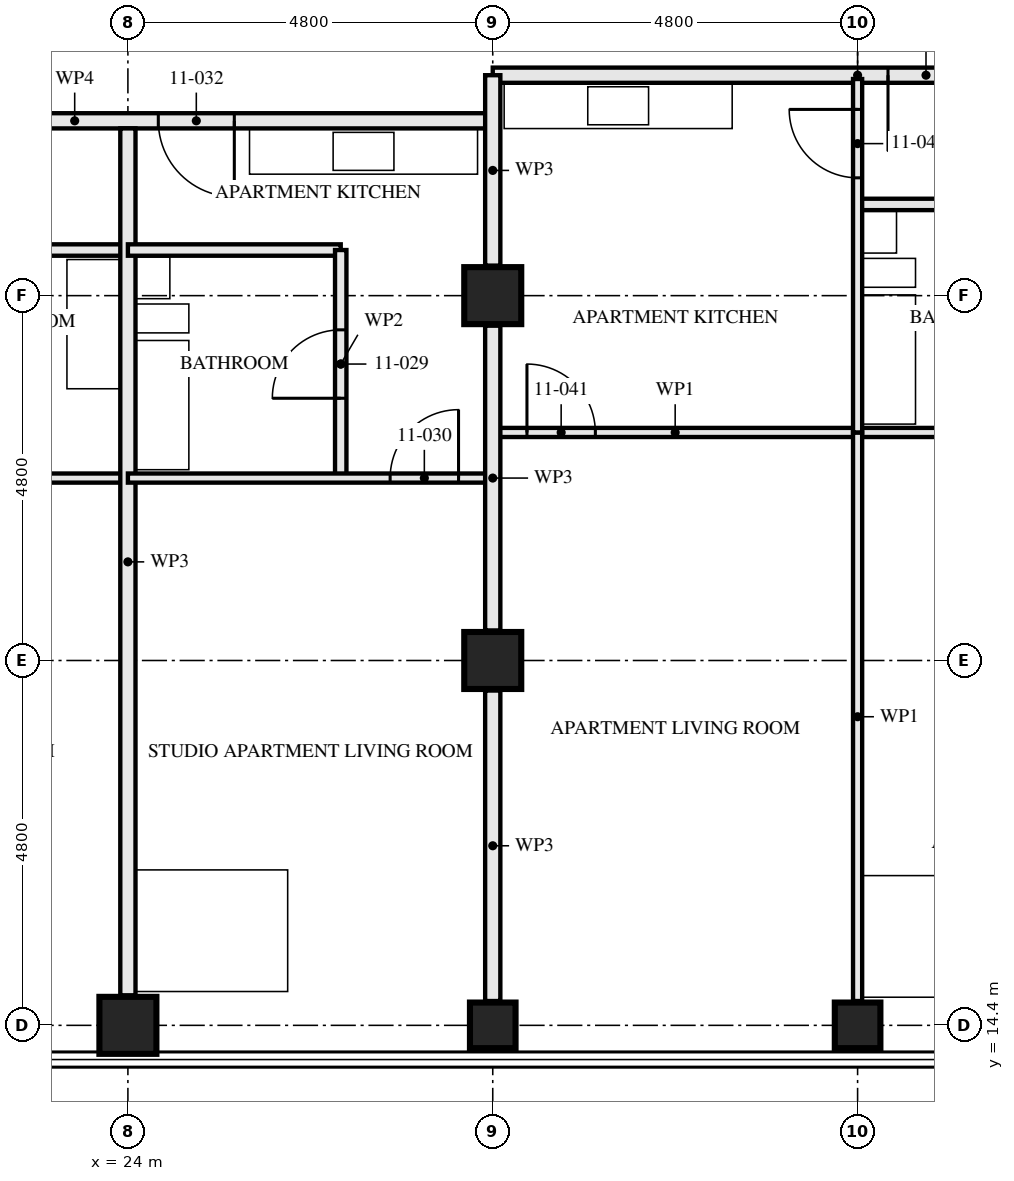
"""IFC4 building model, lengths in metres.
Left out: names, types, materials, properties, quantities, classifications, styles, units other than length and angle.
Written with IfcOpenShell. Run it as: python <this file> out.ifc"""

import sys

from ifc_helpers import new_model, si_unit, direction, frame, frame_2d, origin, origin_2d, place, context, subcontext, project, spatial, rectangle, hollow_rectangle, extrude, element, fill, save


model = new_model("IFC4")
c1 = context("Model", 3, precision=1e-05, world=origin(), true_north=direction((0.0, 1.0)))
c2 = subcontext(c1, "Body", "Model", "MODEL_VIEW")
j1 = project(units=[si_unit("LENGTHUNIT", "METRE"), si_unit("PLANEANGLEUNIT", "RADIAN")], contexts=[c1])
p1 = place(None, origin())
s1 = spatial("IfcSite", under=j1, at=p1, CompositionType="ELEMENT")
p2 = place(p1, origin())
s2 = spatial("IfcBuilding", under=s1, at=p2, CompositionType="ELEMENT")
p3 = place(p2, frame((0.0, 0.0, 44.5)))
s3 = spatial("IfcBuildingStorey", under=s2, at=p3, CompositionType="ELEMENT", Elevation=44.5)
p4 = place(p3, frame((24.0, 14.4, 0.0), z_axis=(0.0, 0.0, 1.0), x_axis=(0.0, 1.0, 0.0)))
e1 = element("IfcColumn", 1, at=p4, inside=s3, PredefinedType="COLUMN", context=c2, shape_type="SweptSolid", body=[
    extrude(hollow_rectangle(XDim=0.75, YDim=0.75, WallThickness=0.08, at=origin_2d()), origin(), (0.0, 0.0, 1.0), 3.5),
])
p5 = place(p3, frame((28.8, 14.4, 0.0), z_axis=(0.0, 0.0, 1.0), x_axis=(0.0, 1.0, 0.0)))
e2 = element("IfcColumn", 2, at=p5, inside=s3, PredefinedType="COLUMN", context=c2, shape_type="SweptSolid", body=[
    extrude(hollow_rectangle(XDim=0.6, YDim=0.6, WallThickness=0.08, at=origin_2d()), origin(), (0.0, 0.0, 1.0), 3.5),
])
for number, where, z_axis, x_axis in (
    (3, (28.8, 19.2, 0.0), (0.0, 0.0, 1.0), (1.0, 0.0, 0.0)),
    (4, (28.8, 24.0, 0.0), (0.0, 0.0, 1.0), (1.0, 0.0, 0.0)),
):
    element("IfcColumn", number, at=place(p3, frame(where, z_axis=z_axis, x_axis=x_axis)), inside=s3, PredefinedType="COLUMN", context=c2, shape_type="SweptSolid", body=[
        extrude(hollow_rectangle(XDim=0.75, YDim=0.75, WallThickness=0.08, at=origin_2d()), origin(), (0.0, 0.0, 1.0), 3.5),
    ])
p6 = place(p3, frame((33.6, 14.4, 0.0), z_axis=(0.0, 0.0, 1.0), x_axis=(0.0, 1.0, 0.0)))
e5 = element("IfcColumn", 5, at=p6, inside=s3, PredefinedType="COLUMN", context=c2, shape_type="SweptSolid", body=[
    extrude(hollow_rectangle(XDim=0.6, YDim=0.6, WallThickness=0.08, at=origin_2d()), origin(), (0.0, 0.0, 1.0), 3.5),
])
p7 = place(p3, frame((21.2, 24.6, 0.0), z_axis=(0.0, 0.0, 1.0), x_axis=(1.0, 0.0, 0.0)))
e6 = element("IfcWall", 6, at=p7, inside=s3, PredefinedType="PARTITIONING", context=c2, shape_type="SweptSolid", body=[
    extrude(rectangle(XDim=2.8, YDim=0.15, at=frame_2d((1.4, 0.0))), origin(), (0.0, 0.0, 1.0), 3.33),
])
p8 = place(p3, frame((19.2, 21.6, 0.0), z_axis=(0.0, 0.0, 1.0), x_axis=(1.0, 0.0, 0.0)))
e7 = element("IfcWall", 7, at=p8, inside=s3, PredefinedType="PARTITIONING", context=c2, shape_type="SweptSolid", body=[
    extrude(rectangle(XDim=4.8, YDim=0.12, at=frame_2d((2.4, 0.0))), origin(), (0.0, 0.0, 1.0), 3.33),
])
p9 = place(p8, frame((0.45, 0.0, 0.0)))
e8 = element("IfcOpeningElement", 8, at=p9, cuts=e7, PredefinedType="OPENING", context=c2, shape_type="SweptSolid", body=[
    extrude(rectangle(XDim=0.9, YDim=2.1, at=frame_2d((0.45, 1.05))), frame((0.0, 0.071, 0.0), z_axis=(0.0, -1.0, 0.0), x_axis=(1.0, 0.0, 0.0)), (0.0, 0.0, 1.0), 0.141),
])
p10 = place(p3, frame((24.0, 14.795, 0.0), z_axis=(0.0, 0.0, 1.0), x_axis=(0.0, 1.0, 0.0)))
e9 = element("IfcWall", 9, at=p10, inside=s3, PredefinedType="PARTITIONING", context=c2, shape_type="SweptSolid", body=[
    extrude(rectangle(XDim=11.405, YDim=0.2, at=frame_2d((5.703, 0.0))), origin(), (0.0, 0.0, 1.0), 2.55),
])
p11 = place(p3, frame((26.8, 21.6, 0.0), z_axis=(0.0, 0.0, 1.0), x_axis=(0.0, 1.0, 0.0)))
e10 = element("IfcWall", 10, at=p11, inside=s3, PredefinedType="PARTITIONING", context=c2, shape_type="SweptSolid", body=[
    extrude(rectangle(XDim=3.0, YDim=0.15, at=frame_2d((1.5, 0.0))), origin(), (0.0, 0.0, 1.0), 2.55),
])
p12 = place(p11, frame((1.05, 0.0, 0.0)))
e11 = element("IfcOpeningElement", 11, at=p12, cuts=e10, PredefinedType="OPENING", context=c2, shape_type="SweptSolid", body=[
    extrude(rectangle(XDim=0.9, YDim=2.1, at=frame_2d((0.45, 1.05))), frame((0.0, 0.085, 0.0), z_axis=(0.0, -1.0, 0.0), x_axis=(1.0, 0.0, 0.0)), (0.0, 0.0, 1.0), 0.171),
])
p13 = place(p3, frame((24.0, 24.6, 0.0), z_axis=(0.0, 0.0, 1.0), x_axis=(1.0, 0.0, 0.0)))
e12 = element("IfcWall", 12, at=p13, inside=s3, PredefinedType="PARTITIONING", context=c2, shape_type="SweptSolid", body=[
    extrude(rectangle(XDim=2.8, YDim=0.15, at=frame_2d((1.4, 0.0))), origin(), (0.0, 0.0, 1.0), 3.33),
])
p14 = place(p3, frame((24.0, 21.6, 0.0), z_axis=(0.0, 0.0, 1.0), x_axis=(1.0, 0.0, 0.0)))
e13 = element("IfcWall", 13, at=p14, inside=s3, PredefinedType="PARTITIONING", context=c2, shape_type="SweptSolid", body=[
    extrude(rectangle(XDim=4.8, YDim=0.12, at=frame_2d((2.4, 0.0))), origin(), (0.0, 0.0, 1.0), 3.33),
])
p15 = place(p14, frame((3.45, 0.0, 0.0)))
e14 = element("IfcOpeningElement", 14, at=p15, cuts=e13, PredefinedType="OPENING", context=c2, shape_type="SweptSolid", body=[
    extrude(rectangle(XDim=0.9, YDim=2.1, at=frame_2d((0.45, 1.05))), frame((0.0, 0.071, 0.0), z_axis=(0.0, -1.0, 0.0), x_axis=(1.0, 0.0, 0.0)), (0.0, 0.0, 1.0), 0.141),
])
p16 = place(p3, frame((17.8, 26.3, 0.0), z_axis=(0.0, 0.0, 1.0), x_axis=(1.0, 0.0, 0.0)))
e15 = element("IfcWall", 15, at=p16, inside=s3, PredefinedType="PARTITIONING", context=c2, shape_type="SweptSolid", body=[
    extrude(rectangle(XDim=11.0, YDim=0.2, at=frame_2d((5.5, 0.0))), origin(), (0.0, 0.0, 1.0), 2.55),
])
p17 = place(p16, frame((1.8, 0.0, 0.0)))
e16 = element("IfcOpeningElement", 16, at=p17, cuts=e15, PredefinedType="OPENING", context=c2, shape_type="SweptSolid", body=[
    extrude(rectangle(XDim=1.0, YDim=2.1, at=frame_2d((0.5, 1.05))), frame((0.0, 0.111, 0.0), z_axis=(0.0, -1.0, 0.0), x_axis=(1.0, 0.0, 0.0)), (0.0, 0.0, 1.0), 0.221),
])
p18 = place(p16, frame((6.6, 0.0, 0.0)))
e17 = element("IfcOpeningElement", 17, at=p18, cuts=e15, PredefinedType="OPENING", context=c2, shape_type="SweptSolid", body=[
    extrude(rectangle(XDim=1.0, YDim=2.1, at=frame_2d((0.5, 1.05))), frame((0.0, 0.111, 0.0), z_axis=(0.0, -1.0, 0.0), x_axis=(1.0, 0.0, 0.0)), (0.0, 0.0, 1.0), 0.221),
])
p19 = place(p3, frame((33.6, 25.2, 0.0), z_axis=(0.0, 0.0, 1.0), x_axis=(1.0, 0.0, 0.0)))
e18 = element("IfcWall", 18, at=p19, inside=s3, PredefinedType="PARTITIONING", context=c2, shape_type="SweptSolid", body=[
    extrude(rectangle(XDim=2.8, YDim=0.15, at=frame_2d((1.4, 0.0))), origin(), (0.0, 0.0, 1.0), 3.33),
])
p20 = place(p3, frame((33.6, 22.2, 0.0), z_axis=(0.0, 0.0, 1.0), x_axis=(0.0, 1.0, 0.0)))
e19 = element("IfcWall", 19, at=p20, inside=s3, PredefinedType="PARTITIONING", context=c2, shape_type="SweptSolid", body=[
    extrude(rectangle(XDim=4.65, YDim=0.12, at=frame_2d((2.325, 0.0))), origin(), (0.0, 0.0, 1.0), 2.55),
])
p21 = place(p20, frame((3.35, 0.0, 0.0)))
e20 = element("IfcOpeningElement", 20, at=p21, cuts=e19, PredefinedType="OPENING", context=c2, shape_type="SweptSolid", body=[
    extrude(rectangle(XDim=0.9, YDim=2.1, at=frame_2d((0.45, 1.05))), frame((0.0, 0.071, 0.0), z_axis=(0.0, -1.0, 0.0), x_axis=(1.0, 0.0, 0.0)), (0.0, 0.0, 1.0), 0.141),
])
p22 = place(p3, frame((28.8, 22.2, 0.0), z_axis=(0.0, 0.0, 1.0), x_axis=(1.0, 0.0, 0.0)))
e21 = element("IfcWall", 21, at=p22, inside=s3, PredefinedType="PARTITIONING", context=c2, shape_type="SweptSolid", body=[
    extrude(rectangle(XDim=4.8, YDim=0.12, at=frame_2d((2.4, 0.0))), origin(), (0.0, 0.0, 1.0), 3.33),
])
p23 = place(p22, frame((0.45, 0.0, 0.0)))
e22 = element("IfcOpeningElement", 22, at=p23, cuts=e21, PredefinedType="OPENING", context=c2, shape_type="SweptSolid", body=[
    extrude(rectangle(XDim=0.9, YDim=2.1, at=frame_2d((0.45, 1.05))), frame((0.0, 0.071, 0.0), z_axis=(0.0, -1.0, 0.0), x_axis=(1.0, 0.0, 0.0)), (0.0, 0.0, 1.0), 0.141),
])
p24 = place(p3, frame((33.6, 22.2, 0.0), z_axis=(0.0, 0.0, 1.0), x_axis=(1.0, 0.0, 0.0)))
e23 = element("IfcWall", 23, at=p24, inside=s3, PredefinedType="PARTITIONING", context=c2, shape_type="SweptSolid", body=[
    extrude(rectangle(XDim=4.8, YDim=0.12, at=frame_2d((2.4, 0.0))), origin(), (0.0, 0.0, 1.0), 3.33),
])
p25 = place(p24, frame((3.45, 0.0, 0.0)))
e24 = element("IfcOpeningElement", 24, at=p25, cuts=e23, PredefinedType="OPENING", context=c2, shape_type="SweptSolid", body=[
    extrude(rectangle(XDim=0.9, YDim=2.1, at=frame_2d((0.45, 1.05))), frame((0.0, 0.071, 0.0), z_axis=(0.0, -1.0, 0.0), x_axis=(1.0, 0.0, 0.0)), (0.0, 0.0, 1.0), 0.141),
])
p26 = place(p3, frame((33.6, 14.72, 0.0), z_axis=(0.0, 0.0, 1.0), x_axis=(0.0, 1.0, 0.0)))
e25 = element("IfcWall", 25, at=p26, inside=s3, PredefinedType="PARTITIONING", context=c2, shape_type="SweptSolid", body=[
    extrude(rectangle(XDim=7.48, YDim=0.12, at=frame_2d((3.74, 0.0))), origin(), (0.0, 0.0, 1.0), 2.55),
])
p27 = place(p3, frame((28.8, 26.9, 0.0), z_axis=(0.0, 0.0, 1.0), x_axis=(1.0, 0.0, 0.0)))
e26 = element("IfcWall", 26, at=p27, inside=s3, PredefinedType="PARTITIONING", context=c2, shape_type="SweptSolid", body=[
    extrude(rectangle(XDim=9.6, YDim=0.2, at=frame_2d((4.8, 0.0))), origin(), (0.0, 0.0, 1.0), 3.33),
])
p28 = place(p27, frame((5.2, 0.0, 0.0)))
e27 = element("IfcOpeningElement", 27, at=p28, cuts=e26, PredefinedType="OPENING", context=c2, shape_type="SweptSolid", body=[
    extrude(rectangle(XDim=1.0, YDim=2.1, at=frame_2d((0.5, 1.05))), frame((0.0, 0.111, 0.0), z_axis=(0.0, -1.0, 0.0), x_axis=(1.0, 0.0, 0.0)), (0.0, 0.0, 1.0), 0.221),
])
p29 = place(p3, frame((28.8, 14.72, 0.0), z_axis=(0.0, 0.0, 1.0), x_axis=(0.0, 1.0, 0.0)))
e28 = element("IfcWall", 28, at=p29, inside=s3, PredefinedType="PARTITIONING", context=c2, shape_type="SweptSolid", body=[
    extrude(rectangle(XDim=4.085, YDim=0.2, at=frame_2d((2.042, 0.0))), origin(), (0.0, 0.0, 1.0), 2.32),
])
p30 = place(p3, frame((28.8, 19.595, 0.0), z_axis=(0.0, 0.0, 1.0), x_axis=(0.0, 1.0, 0.0)))
e29 = element("IfcWall", 29, at=p30, inside=s3, PredefinedType="PARTITIONING", context=c2, shape_type="SweptSolid", body=[
    extrude(rectangle(XDim=4.01, YDim=0.2, at=frame_2d((2.005, 0.0))), origin(), (0.0, 0.0, 1.0), 2.32),
])
p31 = place(p3, frame((28.8, 24.395, 0.0), z_axis=(0.0, 0.0, 1.0), x_axis=(0.0, 1.0, 0.0)))
e30 = element("IfcWall", 30, at=p31, inside=s3, PredefinedType="PARTITIONING", context=c2, shape_type="SweptSolid", body=[
    extrude(rectangle(XDim=2.505, YDim=0.2, at=frame_2d((1.252, 0.0))), origin(), (0.0, 0.0, 1.0), 2.32),
])
p32 = place(p12, origin())
e31 = element("IfcDoor", 31, at=p32, inside=s3, OperationType="SINGLE_SWING_RIGHT", PredefinedType="DOOR", context=c2, shape_type="SweptSolid", body=[
    extrude(rectangle(XDim=0.9, YDim=2.1, at=frame_2d((0.45, 1.05))), frame((0.0, 0.022, 0.0), z_axis=(0.0, -1.0, 0.0), x_axis=(1.0, 0.0, 0.0)), (0.0, 0.0, 1.0), 0.044),
])
fill(e11, e31)
p33 = place(p15, origin())
e32 = element("IfcDoor", 32, at=p33, inside=s3, OperationType="SINGLE_SWING_LEFT", PredefinedType="DOOR", context=c2, shape_type="SweptSolid", body=[
    extrude(rectangle(XDim=0.9, YDim=2.1, at=frame_2d((0.45, 1.05))), frame((0.0, 0.022, 0.0), z_axis=(0.0, -1.0, 0.0), x_axis=(1.0, 0.0, 0.0)), (0.0, 0.0, 1.0), 0.044),
])
fill(e14, e32)
p34 = place(p18, frame((1.0, 0.0, 0.0), z_axis=(0.0, 0.0, 1.0), x_axis=(-1.0, 0.0, 0.0)))
e33 = element("IfcDoor", 33, at=p34, inside=s3, OperationType="SINGLE_SWING_RIGHT", PredefinedType="DOOR", context=c2, shape_type="SweptSolid", body=[
    extrude(rectangle(XDim=1.0, YDim=2.1, at=frame_2d((0.5, 1.05))), frame((0.0, 0.027, 0.0), z_axis=(0.0, -1.0, 0.0), x_axis=(1.0, 0.0, 0.0)), (0.0, 0.0, 1.0), 0.054),
])
fill(e17, e33)
p35 = place(p21, origin())
e34 = element("IfcDoor", 34, at=p35, inside=s3, OperationType="SINGLE_SWING_LEFT", PredefinedType="DOOR", context=c2, shape_type="SweptSolid", body=[
    extrude(rectangle(XDim=0.9, YDim=2.1, at=frame_2d((0.45, 1.05))), frame((0.0, 0.022, 0.0), z_axis=(0.0, -1.0, 0.0), x_axis=(1.0, 0.0, 0.0)), (0.0, 0.0, 1.0), 0.044),
])
fill(e20, e34)
p36 = place(p23, origin())
e35 = element("IfcDoor", 35, at=p36, inside=s3, OperationType="SINGLE_SWING_RIGHT", PredefinedType="DOOR", context=c2, shape_type="SweptSolid", body=[
    extrude(rectangle(XDim=0.9, YDim=2.1, at=frame_2d((0.45, 1.05))), frame((0.0, 0.022, 0.0), z_axis=(0.0, -1.0, 0.0), x_axis=(1.0, 0.0, 0.0)), (0.0, 0.0, 1.0), 0.044),
])
fill(e22, e35)
p37 = place(p28, frame((1.0, 0.0, 0.0), z_axis=(0.0, 0.0, 1.0), x_axis=(-1.0, 0.0, 0.0)))
e36 = element("IfcDoor", 36, at=p37, inside=s3, OperationType="SINGLE_SWING_LEFT", PredefinedType="DOOR", context=c2, shape_type="SweptSolid", body=[
    extrude(rectangle(XDim=1.0, YDim=2.1, at=frame_2d((0.5, 1.05))), frame((0.0, 0.027, 0.0), z_axis=(0.0, -1.0, 0.0), x_axis=(1.0, 0.0, 0.0)), (0.0, 0.0, 1.0), 0.054),
])
fill(e27, e36)
save(model, sys.argv[1])
